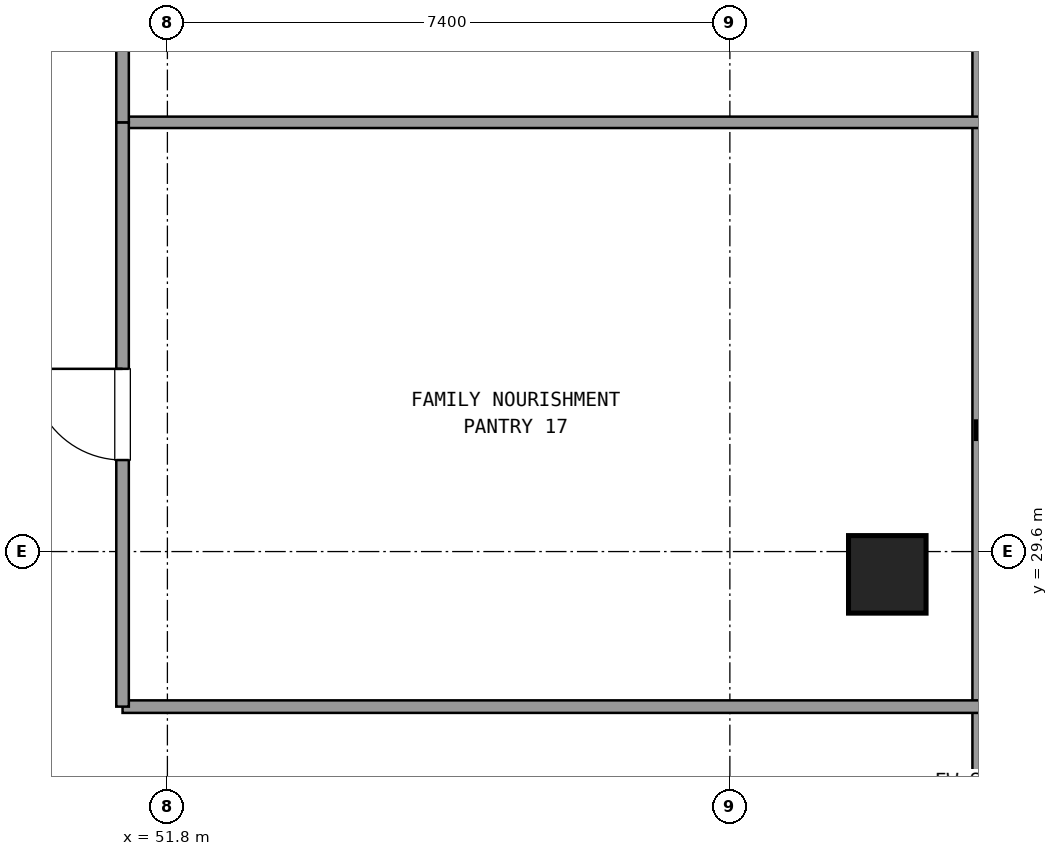
"""IFC4 building model, lengths in metres.
Left out: names, types, materials, properties, quantities, classifications, styles, units other than length and angle.
Written with IfcOpenShell. Run it as: python <this file> out.ifc"""

import sys

from ifc_helpers import new_model, si_unit, direction, frame, frame_2d, origin, origin_2d, place, context, subcontext, project, spatial, rectangle, extrude, element, fill, save


model = new_model("IFC4")
c1 = context("Model", 3, precision=1e-05, world=origin(), true_north=direction((0.0, 1.0)))
c2 = subcontext(c1, "Body", "Model", "MODEL_VIEW")
j1 = project(units=[si_unit("LENGTHUNIT", "METRE"), si_unit("PLANEANGLEUNIT", "RADIAN")], contexts=[c1])
p1 = place(None, origin())
s1 = spatial("IfcSite", under=j1, at=p1, CompositionType="ELEMENT")
p2 = place(p1, origin())
s2 = spatial("IfcBuilding", under=s1, at=p2, CompositionType="ELEMENT")
p3 = place(p2, frame((0.0, 0.0, 102.78)))
s3 = spatial("IfcBuildingStorey", under=s2, at=p3, CompositionType="ELEMENT", Elevation=102.78)
p4 = place(p3, frame((61.271, 29.3, 0.021), z_axis=(-0.084850379912, 0.0, 0.996393703828), x_axis=(0.0, -1.0, 0.0)))
e1 = element("IfcColumn", 1, at=p4, inside=s3, PredefinedType="COLUMN", context=c2, shape_type="SweptSolid", body=[
    extrude(rectangle(XDim=1.02, YDim=1.02, at=origin_2d()), origin(), (0.0, 0.0, 1.0), 3.571),
])
p5 = place(p3, frame((62.511, 10.009, 0.0), z_axis=(0.0, 0.0, 1.0), x_axis=(0.0, 1.0, 0.0)))
e2 = element("IfcWall", 2, at=p5, inside=s3, PredefinedType="SOLIDWALL", context=c2, shape_type="SweptSolid", body=[
    extrude(rectangle(XDim=31.782, YDim=0.24, at=frame_2d((15.891, 0.0))), origin(), (0.0, 0.0, 1.0), 0.85),
])
p6 = place(p3, frame((51.21, 27.56, 0.0), z_axis=(0.0, 0.0, 1.0), x_axis=(1.0, 0.0, 0.0)))
e3 = element("IfcWall", 3, at=p6, inside=s3, PredefinedType="PARTITIONING", context=c2, shape_type="SweptSolid", body=[
    extrude(rectangle(XDim=11.281, YDim=0.165, at=frame_2d((5.641, 0.0))), origin(), (0.0, 0.0, 1.0), 2.61),
])
p7 = place(p3, frame((51.21, 35.247, 0.0), z_axis=(0.0, 0.0, 1.0), x_axis=(1.0, 0.0, 0.0)))
e4 = element("IfcWall", 4, at=p7, inside=s3, PredefinedType="PARTITIONING", context=c2, shape_type="SweptSolid", body=[
    extrude(rectangle(XDim=11.281, YDim=0.15, at=frame_2d((5.641, 0.0))), origin(), (0.0, 0.0, 1.0), 2.61),
])
p8 = place(p3, frame((51.21, 27.56, 0.0), z_axis=(0.0, 0.0, 1.0), x_axis=(0.0, 1.0, 0.0)))
e5 = element("IfcWall", 5, at=p8, inside=s3, PredefinedType="PARTITIONING", context=c2, shape_type="SweptSolid", body=[
    extrude(rectangle(XDim=7.687, YDim=0.165, at=frame_2d((3.844, 0.0))), origin(), (0.0, 0.0, 1.0), 2.61),
])
p9 = place(p8, frame((3.244, 0.0, 0.0)))
e6 = element("IfcOpeningElement", 6, at=p9, cuts=e5, PredefinedType="OPENING", context=c2, shape_type="SweptSolid", body=[
    extrude(rectangle(XDim=1.2, YDim=2.15, at=frame_2d((0.6, 1.075))), frame((0.0, 0.093, 0.0), z_axis=(0.0, -1.0, 0.0), x_axis=(1.0, 0.0, 0.0)), (0.0, 0.0, 1.0), 0.185),
])
p10 = place(p3, frame((51.21, 35.247, 0.0), z_axis=(0.0, 0.0, 1.0), x_axis=(0.0, 1.0, 0.0)))
e7 = element("IfcWall", 7, at=p10, inside=s3, PredefinedType="PARTITIONING", context=c2, shape_type="SweptSolid", body=[
    extrude(rectangle(XDim=6.039, YDim=0.165, at=frame_2d((3.02, 0.0))), origin(), (0.0, 0.0, 1.0), 2.61),
])
p11 = place(p10, frame((2.42, 0.0, 0.0)))
e8 = element("IfcOpeningElement", 8, at=p11, cuts=e7, PredefinedType="OPENING", context=c2, shape_type="SweptSolid", body=[
    extrude(rectangle(XDim=1.2, YDim=2.15, at=frame_2d((0.6, 1.075))), frame((0.0, 0.093, 0.0), z_axis=(0.0, -1.0, 0.0), x_axis=(1.0, 0.0, 0.0)), (0.0, 0.0, 1.0), 0.185),
])
p12 = place(p9, origin())
e9 = element("IfcDoor", 9, at=p12, inside=s3, OperationType="SINGLE_SWING_RIGHT", PredefinedType="DOOR", context=c2, shape_type="SweptSolid", body=[
    extrude(rectangle(XDim=1.2, YDim=2.15, at=frame_2d((0.6, 1.075))), frame((0.0, 0.025, 0.0), z_axis=(0.0, -1.0, 0.0), x_axis=(1.0, 0.0, 0.0)), (0.0, 0.0, 1.0), 0.05),
])
fill(e6, e9)
save(model, sys.argv[1])
